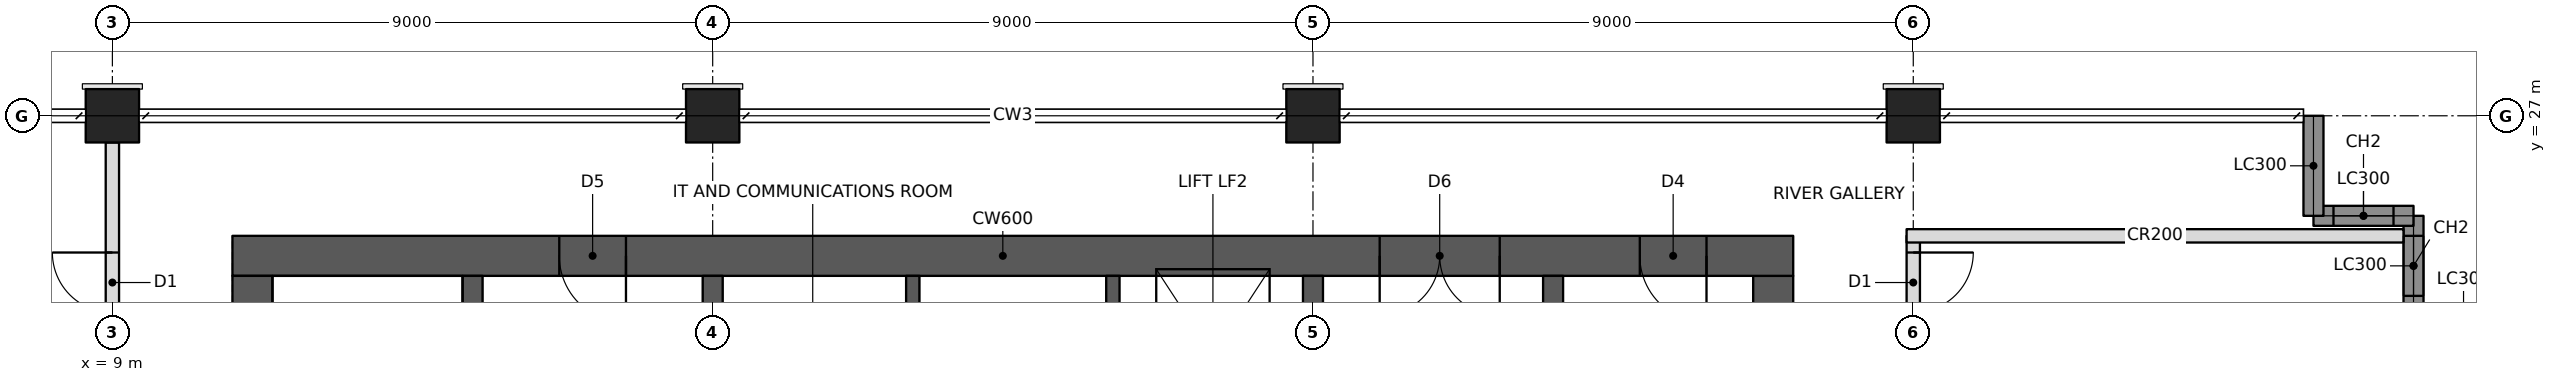
"""IFC4 building model, lengths in metres.
Left out: names, types, materials, properties, quantities, classifications, styles, units other than length and angle.
Written with IfcOpenShell. Run it as: python <this file> out.ifc"""

import sys

from ifc_helpers import new_model, si_unit, direction, frame, frame_2d, origin, origin_2d, place, context, subcontext, project, spatial, rectangle, hollow_rectangle, extrude, element, fill, save


model = new_model("IFC4")
c1 = context("Model", 3, precision=1e-05, world=origin(), true_north=direction((0.0, 1.0)))
c2 = subcontext(c1, "Body", "Model", "MODEL_VIEW")
j1 = project(units=[si_unit("LENGTHUNIT", "METRE"), si_unit("PLANEANGLEUNIT", "RADIAN")], contexts=[c1])
p1 = place(None, origin())
s1 = spatial("IfcSite", under=j1, at=p1, CompositionType="ELEMENT")
p2 = place(p1, origin())
s2 = spatial("IfcBuilding", under=s1, at=p2, CompositionType="ELEMENT")
p3 = place(p2, frame((0.0, 0.0, 191.0)))
s3 = spatial("IfcBuildingStorey", under=s2, at=p3, CompositionType="ELEMENT", Elevation=191.0)
for number, where, z_axis, x_axis in (
    (1, (9.0, 27.0, 0.0), (0.0, 0.0, 1.0), (1.0, 0.0, 0.0)),
    (2, (18.0, 27.0, 0.0), (0.0, 0.0, 1.0), (1.0, 0.0, 0.0)),
    (3, (27.0, 27.0, 0.0), (0.0, 0.0, 1.0), (1.0, 0.0, 0.0)),
    (4, (36.0, 27.0, 0.0), (0.0, 0.0, 1.0), (1.0, 0.0, 0.0)),
):
    element("IfcColumn", number, at=place(p3, frame(where, z_axis=z_axis, x_axis=x_axis)), inside=s3, PredefinedType="COLUMN", context=c2, shape_type="SweptSolid", body=[
        extrude(hollow_rectangle(XDim=0.8, YDim=0.8, WallThickness=0.07, at=origin_2d()), origin(), (0.0, 0.0, 1.0), 3.4),
    ])
p4 = place(p3, frame((10.8, 24.9, 0.0), z_axis=(0.0, 0.0, 1.0), x_axis=(1.0, 0.0, 0.0)))
e5 = element("IfcWall", 5, at=p4, inside=s3, PredefinedType="SHEAR", context=c2, shape_type="SweptSolid", body=[
    extrude(rectangle(XDim=23.4, YDim=0.6, at=frame_2d((11.7, 0.0))), origin(), (0.0, 0.0, 1.0), 3.4),
])
p5 = place(p4, frame((17.2, 0.0, 0.0)))
e6 = element("IfcOpeningElement", 6, at=p5, cuts=e5, PredefinedType="OPENING", context=c2, shape_type="SweptSolid", body=[
    extrude(rectangle(XDim=1.8, YDim=2.1, at=frame_2d((0.9, 1.05))), frame((0.0, 0.31, 0.0), z_axis=(0.0, -1.0, 0.0), x_axis=(1.0, 0.0, 0.0)), (0.0, 0.0, 1.0), 0.62),
])
p6 = place(p4, frame((21.1, 0.0, 0.0)))
e7 = element("IfcOpeningElement", 7, at=p6, cuts=e5, PredefinedType="OPENING", context=c2, shape_type="SweptSolid", body=[
    extrude(rectangle(XDim=1.0, YDim=2.1, at=frame_2d((0.5, 1.05))), frame((0.0, 0.31, 0.0), z_axis=(0.0, -1.0, 0.0), x_axis=(1.0, 0.0, 0.0)), (0.0, 0.0, 1.0), 0.62),
])
p7 = place(p4, frame((4.9, 0.0, 0.0)))
e8 = element("IfcOpeningElement", 8, at=p7, cuts=e5, PredefinedType="OPENING", context=c2, shape_type="SweptSolid", body=[
    extrude(rectangle(XDim=1.0, YDim=2.1, at=frame_2d((0.5, 1.05))), frame((0.0, 0.31, 0.0), z_axis=(0.0, -1.0, 0.0), x_axis=(1.0, 0.0, 0.0)), (0.0, 0.0, 1.0), 0.62),
])
for number, where, z_axis, x_axis in (
    (9, (11.1, 11.4, 0.0), (0.0, 0.0, 1.0), (0.0, 1.0, 0.0)),
    (10, (33.9, 11.4, 0.0), (0.0, 0.0, 1.0), (0.0, 1.0, 0.0)),
):
    element("IfcWall", number, at=place(p3, frame(where, z_axis=z_axis, x_axis=x_axis)), inside=s3, PredefinedType="SHEAR", context=c2, shape_type="SweptSolid", body=[
        extrude(rectangle(XDim=13.2, YDim=0.6, at=frame_2d((6.6, 0.0))), origin(), (0.0, 0.0, 1.0), 3.4),
    ])
p8 = place(p3, frame((14.4, 11.4, 0.0), z_axis=(0.0, 0.0, 1.0), x_axis=(0.0, 1.0, 0.0)))
e11 = element("IfcWall", 11, at=p8, inside=s3, PredefinedType="SHEAR", context=c2, shape_type="SweptSolid", body=[
    extrude(rectangle(XDim=13.2, YDim=0.3, at=frame_2d((6.6, 0.0))), origin(), (0.0, 0.0, 1.0), 3.4),
])
p9 = place(p3, frame((18.0, 11.4, 0.0), z_axis=(0.0, 0.0, 1.0), x_axis=(0.0, 1.0, 0.0)))
e12 = element("IfcWall", 12, at=p9, inside=s3, PredefinedType="SHEAR", context=c2, shape_type="SweptSolid", body=[
    extrude(rectangle(XDim=13.2, YDim=0.3, at=frame_2d((6.6, 0.0))), origin(), (0.0, 0.0, 1.0), 3.4),
])
p10 = place(p9, frame((3.6, 0.0, 0.0)))
e13 = element("IfcOpeningElement", 13, at=p10, cuts=e12, PredefinedType="OPENING", context=c2, shape_type="SweptSolid", body=[
    extrude(rectangle(XDim=1.0, YDim=2.1, at=frame_2d((0.5, 1.05))), frame((0.0, 0.16, 0.0), z_axis=(0.0, -1.0, 0.0), x_axis=(1.0, 0.0, 0.0)), (0.0, 0.0, 1.0), 0.32),
])
p11 = place(p9, frame((7.85, 0.0, 0.0)))
e14 = element("IfcOpeningElement", 14, at=p11, cuts=e12, PredefinedType="OPENING", context=c2, shape_type="SweptSolid", body=[
    extrude(rectangle(XDim=1.1, YDim=2.1, at=frame_2d((0.55, 1.05))), frame((0.0, 0.16, 0.0), z_axis=(0.0, -1.0, 0.0), x_axis=(1.0, 0.0, 0.0)), (0.0, 0.0, 1.0), 0.32),
])
p12 = place(p3, frame((27.0, 21.75, 0.0), z_axis=(0.0, 0.0, 1.0), x_axis=(0.0, 1.0, 0.0)))
e15 = element("IfcWall", 15, at=p12, inside=s3, PredefinedType="SHEAR", context=c2, shape_type="SweptSolid", body=[
    extrude(rectangle(XDim=2.85, YDim=0.3, at=frame_2d((1.425, 0.0))), origin(), (0.0, 0.0, 1.0), 3.4),
])
for number, where, z_axis, x_axis in (
    (16, (21.0, 21.75, 0.0), (0.0, 0.0, 1.0), (0.0, 1.0, 0.0)),
    (17, (24.0, 21.75, 0.0), (0.0, 0.0, 1.0), (0.0, 1.0, 0.0)),
):
    element("IfcWall", number, at=place(p3, frame(where, z_axis=z_axis, x_axis=x_axis)), inside=s3, PredefinedType="SHEAR", context=c2, shape_type="SweptSolid", body=[
        extrude(rectangle(XDim=2.85, YDim=0.2, at=frame_2d((1.425, 0.0))), origin(), (0.0, 0.0, 1.0), 3.4),
    ])
p13 = place(p3, frame((30.6, 11.4, 0.0), z_axis=(0.0, 0.0, 1.0), x_axis=(0.0, 1.0, 0.0)))
e18 = element("IfcWall", 18, at=p13, inside=s3, PredefinedType="SHEAR", context=c2, shape_type="SweptSolid", body=[
    extrude(rectangle(XDim=13.2, YDim=0.3, at=frame_2d((6.6, 0.0))), origin(), (0.0, 0.0, 1.0), 3.4),
])
p14 = place(p3, frame((43.5, 24.0, 0.0), z_axis=(0.0, 0.0, 1.0), x_axis=(0.0, 1.0, 0.0)))
e19 = element("IfcWall", 19, at=p14, inside=s3, PredefinedType="SOLIDWALL", context=c2, shape_type="SweptSolid", body=[
    extrude(rectangle(XDim=1.5, YDim=0.3, at=frame_2d((0.75, 0.0))), origin(), (0.0, 0.0, 1.0), 3.2),
])
p15 = place(p14, frame((0.3, 0.0, 0.6)))
e20 = element("IfcOpeningElement", 20, at=p15, cuts=e19, PredefinedType="OPENING", context=c2, shape_type="SweptSolid", body=[
    extrude(rectangle(XDim=0.9, YDim=2.2, at=frame_2d((0.45, 1.1))), frame((0.0, 0.16, 0.0), z_axis=(0.0, -1.0, 0.0), x_axis=(1.0, 0.0, 0.0)), (0.0, 0.0, 1.0), 0.32),
])
p16 = place(p3, frame((43.5, 25.5, 0.0), z_axis=(0.0, 0.0, 1.0), x_axis=(-1.0, 0.0, 0.0)))
e21 = element("IfcWall", 21, at=p16, inside=s3, PredefinedType="SOLIDWALL", context=c2, shape_type="SweptSolid", body=[
    extrude(rectangle(XDim=1.5, YDim=0.3, at=frame_2d((0.75, 0.0))), origin(), (0.0, 0.0, 1.0), 3.2),
])
p17 = place(p16, frame((0.3, 0.0, 0.6)))
e22 = element("IfcOpeningElement", 22, at=p17, cuts=e21, PredefinedType="OPENING", context=c2, shape_type="SweptSolid", body=[
    extrude(rectangle(XDim=0.9, YDim=2.2, at=frame_2d((0.45, 1.1))), frame((0.0, 0.16, 0.0), z_axis=(0.0, -1.0, 0.0), x_axis=(1.0, 0.0, 0.0)), (0.0, 0.0, 1.0), 0.32),
])
p18 = place(p3, frame((42.0, 25.5, 0.0), z_axis=(0.0, 0.0, 1.0), x_axis=(0.0, 1.0, 0.0)))
e23 = element("IfcWall", 23, at=p18, inside=s3, PredefinedType="SOLIDWALL", context=c2, shape_type="SweptSolid", body=[
    extrude(rectangle(XDim=1.5, YDim=0.3, at=frame_2d((0.75, 0.0))), origin(), (0.0, 0.0, 1.0), 2.42),
])
p19 = place(p3, frame((9.0, 18.4, 0.0), z_axis=(0.0, 0.0, 1.0), x_axis=(0.0, 1.0, 0.0)))
e24 = element("IfcWall", 24, at=p19, inside=s3, PredefinedType="PARTITIONING", context=c2, shape_type="SweptSolid", body=[
    extrude(rectangle(XDim=8.2, YDim=0.2, at=frame_2d((4.1, 0.0))), origin(), (0.0, 0.0, 1.0), 2.405),
])
p20 = place(p19, frame((5.65, 0.0, 0.0)))
e25 = element("IfcOpeningElement", 25, at=p20, cuts=e24, PredefinedType="OPENING", context=c2, shape_type="SweptSolid", body=[
    extrude(rectangle(XDim=0.9, YDim=2.1, at=frame_2d((0.45, 1.05))), frame((0.0, 0.11, 0.0), z_axis=(0.0, -1.0, 0.0), x_axis=(1.0, 0.0, 0.0)), (0.0, 0.0, 1.0), 0.22),
])
p21 = place(p3, frame((36.0, 18.4, 0.0), z_axis=(0.0, 0.0, 1.0), x_axis=(0.0, 1.0, 0.0)))
e26 = element("IfcWall", 26, at=p21, inside=s3, PredefinedType="PARTITIONING", context=c2, shape_type="SweptSolid", body=[
    extrude(rectangle(XDim=6.8, YDim=0.2, at=frame_2d((3.4, 0.0))), origin(), (0.0, 0.0, 1.0), 2.405),
])
p22 = place(p21, frame((5.65, 0.0, 0.0)))
e27 = element("IfcOpeningElement", 27, at=p22, cuts=e26, PredefinedType="OPENING", context=c2, shape_type="SweptSolid", body=[
    extrude(rectangle(XDim=0.9, YDim=2.1, at=frame_2d((0.45, 1.05))), frame((0.0, 0.11, 0.0), z_axis=(0.0, -1.0, 0.0), x_axis=(1.0, 0.0, 0.0)), (0.0, 0.0, 1.0), 0.22),
])
p23 = place(p3, frame((35.9, 25.2, 0.0), z_axis=(0.0, 0.0, 1.0), x_axis=(1.0, 0.0, 0.0)))
e28 = element("IfcWall", 28, at=p23, inside=s3, PredefinedType="PARTITIONING", context=c2, shape_type="SweptSolid", body=[
    extrude(rectangle(XDim=7.45, YDim=0.2, at=frame_2d((3.725, 0.0))), origin(), (0.0, 0.0, 1.0), 2.404),
])
p24 = place(p15, origin())
e29 = element("IfcWindow", 29, at=p24, inside=s3, PartitioningType="SINGLE_PANEL", PredefinedType="WINDOW", context=c2, shape_type="SweptSolid", body=[
    extrude(rectangle(XDim=0.9, YDim=2.2, at=frame_2d((0.45, 1.1))), frame((0.0, 0.03, 0.0), z_axis=(0.0, -1.0, 0.0), x_axis=(1.0, 0.0, 0.0)), (0.0, 0.0, 1.0), 0.06),
])
fill(e20, e29)
p25 = place(p17, origin())
e30 = element("IfcWindow", 30, at=p25, inside=s3, PartitioningType="SINGLE_PANEL", PredefinedType="WINDOW", context=c2, shape_type="SweptSolid", body=[
    extrude(rectangle(XDim=0.9, YDim=2.2, at=frame_2d((0.45, 1.1))), frame((0.0, 0.03, 0.0), z_axis=(0.0, -1.0, 0.0), x_axis=(1.0, 0.0, 0.0)), (0.0, 0.0, 1.0), 0.06),
])
fill(e22, e30)
p26 = place(p20, origin())
e31 = element("IfcDoor", 31, at=p26, inside=s3, OperationType="SINGLE_SWING_RIGHT", PredefinedType="DOOR", context=c2, shape_type="SweptSolid", body=[
    extrude(rectangle(XDim=0.9, YDim=2.1, at=frame_2d((0.45, 1.05))), frame((0.0, 0.025, 0.0), z_axis=(0.0, -1.0, 0.0), x_axis=(1.0, 0.0, 0.0)), (0.0, 0.0, 1.0), 0.05),
])
fill(e25, e31)
p27 = place(p22, frame((0.9, 0.0, 0.0), z_axis=(0.0, 0.0, 1.0), x_axis=(-1.0, 0.0, 0.0)))
e32 = element("IfcDoor", 32, at=p27, inside=s3, OperationType="SINGLE_SWING_LEFT", PredefinedType="DOOR", context=c2, shape_type="SweptSolid", body=[
    extrude(rectangle(XDim=0.9, YDim=2.1, at=frame_2d((0.45, 1.05))), frame((0.0, 0.025, 0.0), z_axis=(0.0, -1.0, 0.0), x_axis=(1.0, 0.0, 0.0)), (0.0, 0.0, 1.0), 0.05),
])
fill(e27, e32)
p28 = place(p5, frame((1.8, 0.0, 0.0), z_axis=(0.0, 0.0, 1.0), x_axis=(-1.0, 0.0, 0.0)))
e33 = element("IfcDoor", 33, at=p28, inside=s3, OperationType="DOUBLE_DOOR_SINGLE_SWING", PredefinedType="DOOR", context=c2, shape_type="SweptSolid", body=[
    extrude(rectangle(XDim=1.8, YDim=2.1, at=frame_2d((0.9, 1.05))), frame((0.0, 0.025, 0.0), z_axis=(0.0, -1.0, 0.0), x_axis=(1.0, 0.0, 0.0)), (0.0, 0.0, 1.0), 0.05),
])
fill(e6, e33)
p29 = place(p6, frame((1.0, 0.0, 0.0), z_axis=(0.0, 0.0, 1.0), x_axis=(-1.0, 0.0, 0.0)))
e34 = element("IfcDoor", 34, at=p29, inside=s3, OperationType="SINGLE_SWING_LEFT", PredefinedType="DOOR", context=c2, shape_type="SweptSolid", body=[
    extrude(rectangle(XDim=1.0, YDim=2.1, at=frame_2d((0.5, 1.05))), frame((0.0, 0.025, 0.0), z_axis=(0.0, -1.0, 0.0), x_axis=(1.0, 0.0, 0.0)), (0.0, 0.0, 1.0), 0.05),
])
fill(e7, e34)
p30 = place(p7, frame((1.0, 0.0, 0.0), z_axis=(0.0, 0.0, 1.0), x_axis=(-1.0, 0.0, 0.0)))
e35 = element("IfcDoor", 35, at=p30, inside=s3, OperationType="SINGLE_SWING_LEFT", PredefinedType="DOOR", context=c2, shape_type="SweptSolid", body=[
    extrude(rectangle(XDim=1.0, YDim=2.1, at=frame_2d((0.5, 1.05))), frame((0.0, 0.025, 0.0), z_axis=(0.0, -1.0, 0.0), x_axis=(1.0, 0.0, 0.0)), (0.0, 0.0, 1.0), 0.05),
])
fill(e8, e35)
save(model, sys.argv[1])
